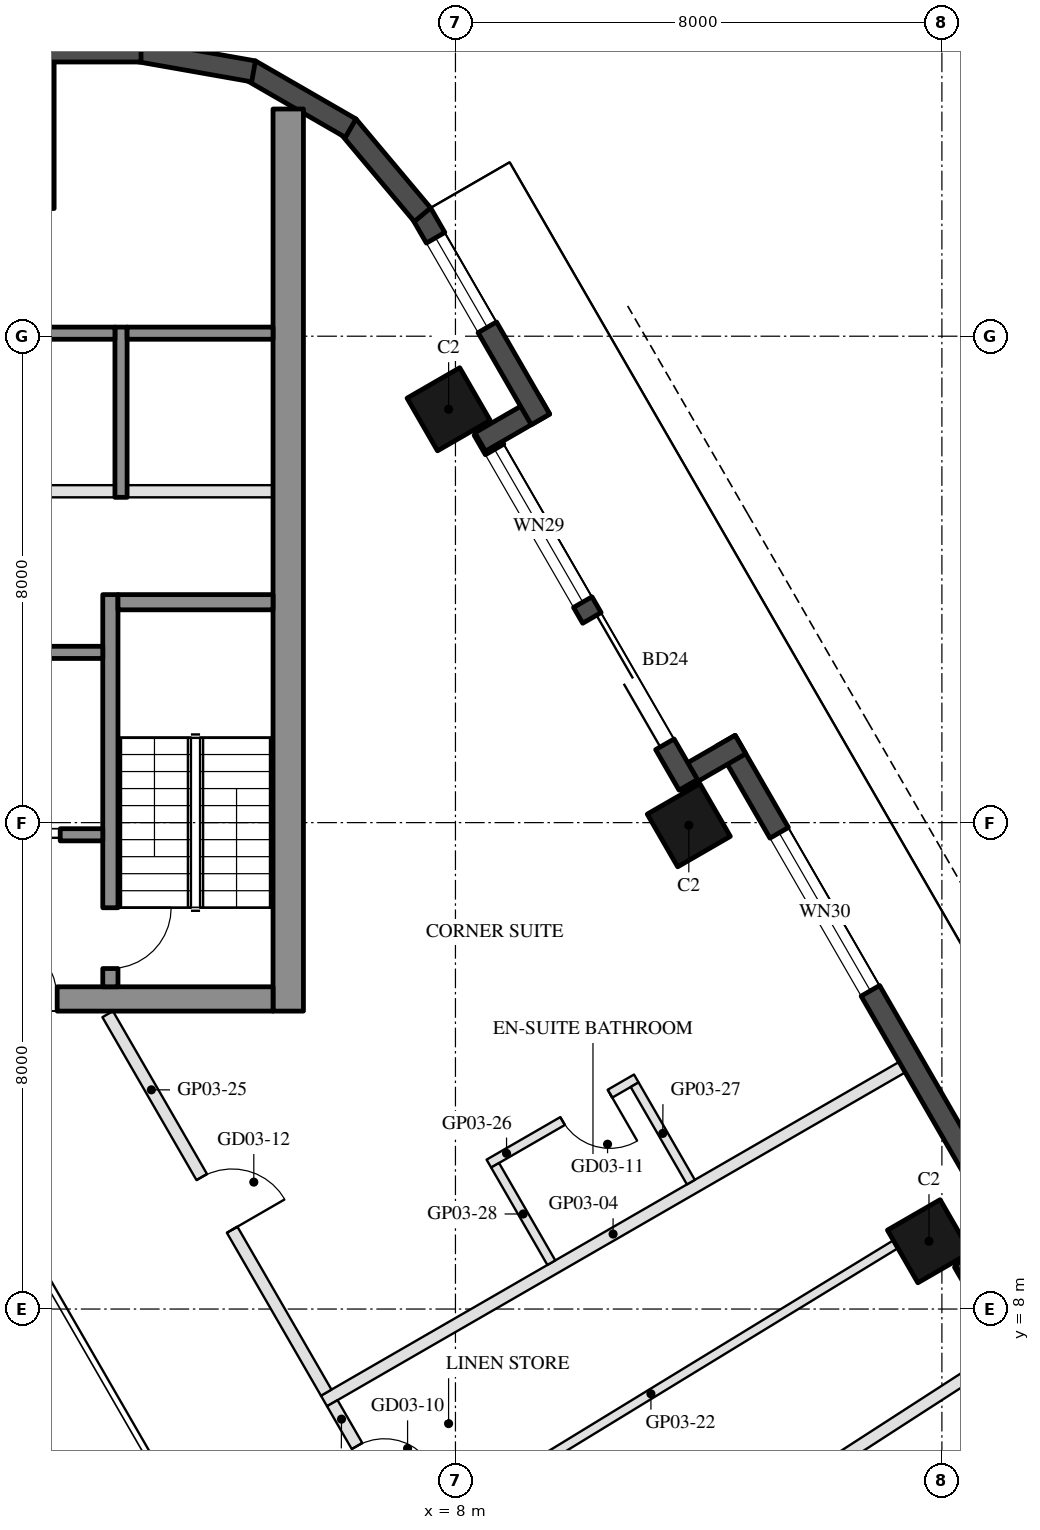
"""IFC4 building model, lengths in metres.
Left out: names, types, materials, properties, quantities, classifications, styles, units other than length and angle.
Written with IfcOpenShell. Run it as: python <this file> out.ifc"""

import sys

from ifc_helpers import new_model, si_unit, direction, frame, frame_2d, origin, origin_2d, place, context, subcontext, project, spatial, rectangle, hollow_rectangle, extrude, element, fill, save


model = new_model("IFC4")
c1 = context("Model", 3, precision=1e-05, world=origin(), true_north=direction((0.0, 1.0)))
c2 = subcontext(c1, "Body", "Model", "MODEL_VIEW")
j1 = project(units=[si_unit("LENGTHUNIT", "METRE"), si_unit("PLANEANGLEUNIT", "RADIAN")], contexts=[c1])
p1 = place(None, origin())
s1 = spatial("IfcSite", under=j1, at=p1, CompositionType="ELEMENT")
p2 = place(p1, origin())
s2 = spatial("IfcBuilding", under=s1, at=p2, CompositionType="ELEMENT")
p3 = place(p2, frame((0.0, 0.0, 68.7)))
s3 = spatial("IfcBuildingStorey", under=s2, at=p3, CompositionType="ELEMENT", Elevation=68.7)
for number, where, z_axis, x_axis in (
    (1, (15.788, 9.115, 0.0), (0.0, 0.0, 1.0), (-0.5, 0.866, 0.0)),
    (2, (11.838, 15.957, 0.0), (0.0, 0.0, 1.0), (-0.5, 0.866, 0.0)),
    (3, (7.888, 22.798, 0.0), (0.0, 0.0, 1.0), (-0.5, 0.866, 0.0)),
):
    element("IfcColumn", number, at=place(p3, frame(where, z_axis=z_axis, x_axis=x_axis)), inside=s3, PredefinedType="COLUMN", context=c2, shape_type="SweptSolid", body=[
        extrude(hollow_rectangle(XDim=1.0, YDim=1.0, WallThickness=0.045, at=origin_2d()), origin(), (0.0, 0.0, 1.0), 3.7),
    ])
p4 = place(p3, frame((0.0, 27.3, 0.0), z_axis=(0.0, 0.0, 1.0), x_axis=(1.0, 0.0, 0.0)))
e4 = element("IfcColumn", 4, at=p4, inside=s3, PredefinedType="COLUMN", context=c2, shape_type="SweptSolid", body=[
    extrude(hollow_rectangle(XDim=2.8, YDim=2.4, WallThickness=0.07, at=origin_2d()), origin(), (0.0, 0.0, 1.0), 3.7),
])
p5 = place(p3, frame((19.729, 2.938, 0.0), z_axis=(0.0, 0.0, 1.0), x_axis=(-0.499976430342, 0.866039011305, 0.0)))
e5 = element("IfcWall", 5, at=p5, inside=s3, PredefinedType="SOLIDWALL", context=c2, shape_type="SweptSolid", body=[
    extrude(rectangle(XDim=6.74, YDim=0.35, at=frame_2d((3.37, 0.0))), origin(), (0.0, 0.0, 1.0), 3.55),
])
p6 = place(p5, frame((0.77, 0.0, 0.3)))
e6 = element("IfcOpeningElement", 6, at=p6, cuts=e5, PredefinedType="OPENING", context=c2, shape_type="SweptSolid", body=[
    extrude(rectangle(XDim=1.7, YDim=2.65, at=frame_2d((0.85, 1.325))), frame((0.0, 0.185, 0.0), z_axis=(0.0, -1.0, 0.0), x_axis=(1.0, 0.0, 0.0)), (0.0, 0.0, 1.0), 0.37),
])
p7 = place(p5, frame((2.77, 0.0, 0.3)))
e7 = element("IfcOpeningElement", 7, at=p7, cuts=e5, PredefinedType="OPENING", context=c2, shape_type="SweptSolid", body=[
    extrude(rectangle(XDim=1.7, YDim=2.65, at=frame_2d((0.85, 1.325))), frame((0.0, 0.185, 0.0), z_axis=(0.0, -1.0, 0.0), x_axis=(1.0, 0.0, 0.0)), (0.0, 0.0, 1.0), 0.37),
])
p8 = place(p3, frame((16.306, 8.577, 0.0), z_axis=(0.0, 0.0, 1.0), x_axis=(0.866092288191, 0.499884134912, 0.0)))
e8 = element("IfcWall", 8, at=p8, inside=s3, PredefinedType="SOLIDWALL", context=c2, shape_type="SweptSolid", body=[
    extrude(rectangle(XDim=1.22, YDim=0.35, at=frame_2d((0.61, 0.0))), origin(), (0.0, 0.0, 1.0), 3.55),
])
p9 = place(p3, frame((17.299, 8.948, 0.0), z_axis=(0.0, 0.0, 1.0), x_axis=(-0.500010041276, 0.866019606374, 0.0)))
e9 = element("IfcWall", 9, at=p9, inside=s3, PredefinedType="SOLIDWALL", context=c2, shape_type="SweptSolid", body=[
    extrude(rectangle(XDim=9.7, YDim=0.35, at=frame_2d((4.85, 0.0))), origin(), (0.0, 0.0, 1.0), 3.55),
])
p10 = place(p9, frame((4.949, 0.0, 0.3)))
e10 = element("IfcOpeningElement", 10, at=p10, cuts=e9, PredefinedType="OPENING", context=c2, shape_type="SweptSolid", body=[
    extrude(rectangle(XDim=3.0, YDim=2.65, at=frame_2d((1.5, 1.325))), frame((0.0, 0.185, 0.0), z_axis=(0.0, -1.0, 0.0), x_axis=(1.0, 0.0, 0.0)), (0.0, 0.0, 1.0), 0.37),
])
p11 = place(p3, frame((12.688, 17.284, 0.0), z_axis=(0.0, 0.0, 1.0), x_axis=(-0.865955602162, -0.500120880472, 0.0)))
e11 = element("IfcWall", 11, at=p11, inside=s3, PredefinedType="SOLIDWALL", context=c2, shape_type="SweptSolid", body=[
    extrude(rectangle(XDim=1.22, YDim=0.35, at=frame_2d((0.61, 0.0))), origin(), (0.0, 0.0, 1.0), 3.55),
])
p12 = place(p3, frame((11.829, 16.621, 0.0), z_axis=(0.0, 0.0, 1.0), x_axis=(-0.500003597184, 0.866023326939, 0.0)))
e12 = element("IfcWall", 12, at=p12, inside=s3, PredefinedType="SOLIDWALL", context=c2, shape_type="SweptSolid", body=[
    extrude(rectangle(XDim=6.74, YDim=0.35, at=frame_2d((3.37, 0.0))), origin(), (0.0, 0.0, 1.0), 3.55),
])
p13 = place(p12, frame((0.77, 0.0, 0.0)))
e13 = element("IfcOpeningElement", 13, at=p13, cuts=e12, PredefinedType="OPENING", context=c2, shape_type="SweptSolid", body=[
    extrude(rectangle(XDim=2.4, YDim=2.4, at=frame_2d((1.2, 1.2))), frame((0.0, 0.185, 0.0), z_axis=(0.0, -1.0, 0.0), x_axis=(1.0, 0.0, 0.0)), (0.0, 0.0, 1.0), 0.37),
])
p14 = place(p12, frame((3.47, 0.0, 0.3)))
e14 = element("IfcOpeningElement", 14, at=p14, cuts=e12, PredefinedType="OPENING", context=c2, shape_type="SweptSolid", body=[
    extrude(rectangle(XDim=2.9, YDim=2.65, at=frame_2d((1.45, 1.325))), frame((0.0, 0.185, 0.0), z_axis=(0.0, -1.0, 0.0), x_axis=(1.0, 0.0, 0.0)), (0.0, 0.0, 1.0), 0.37),
])
p15 = place(p3, frame((8.406, 22.26, 0.0), z_axis=(0.0, 0.0, 1.0), x_axis=(0.865955602162, 0.500120880472, 0.0)))
e15 = element("IfcWall", 15, at=p15, inside=s3, PredefinedType="SOLIDWALL", context=c2, shape_type="SweptSolid", body=[
    extrude(rectangle(XDim=1.22, YDim=0.35, at=frame_2d((0.61, 0.0))), origin(), (0.0, 0.0, 1.0), 3.55),
])
p16 = place(p3, frame((9.398, 22.631, 0.0), z_axis=(0.0, 0.0, 1.0), x_axis=(-0.499954521343, 0.866051659307, 0.0)))
e16 = element("IfcWall", 16, at=p16, inside=s3, PredefinedType="SOLIDWALL", context=c2, shape_type="SweptSolid", body=[
    extrude(rectangle(XDim=3.916, YDim=0.35, at=frame_2d((1.958, 0.0))), origin(), (0.0, 0.0, 1.0), 3.55),
])
p17 = place(p16, frame((1.75, 0.0, 0.3)))
e17 = element("IfcOpeningElement", 17, at=p17, cuts=e16, PredefinedType="OPENING", context=c2, shape_type="SweptSolid", body=[
    extrude(rectangle(XDim=1.7, YDim=2.65, at=frame_2d((0.85, 1.325))), frame((0.0, 0.185, 0.0), z_axis=(0.0, -1.0, 0.0), x_axis=(1.0, 0.0, 0.0)), (0.0, 0.0, 1.0), 0.37),
])
p18 = place(p3, frame((7.458, 25.998, 0.0), z_axis=(0.0, 0.0, 1.0), x_axis=(-0.642808304945, 0.766027077259, 0.0)))
e18 = element("IfcWall", 18, at=p18, inside=s3, PredefinedType="SOLIDWALL", context=c2, shape_type="SweptSolid", body=[
    extrude(rectangle(XDim=1.91, YDim=0.35, at=frame_2d((0.955, 0.0))), origin(), (0.0, 0.0, 1.0), 3.55),
])
for number, where, z_axis, x_axis in (
    (19, (6.277, 27.422, 0.0), (0.0, 0.0, 1.0), (-0.866, 0.5, 0.0)),
    (20, (4.68, 28.356, 0.0), (0.0, 0.0, 1.0), (-0.985, 0.174, 0.0)),
):
    element("IfcWall", number, at=place(p3, frame(where, z_axis=z_axis, x_axis=x_axis)), inside=s3, PredefinedType="SOLIDWALL", context=c2, shape_type="SweptSolid", body=[
        extrude(rectangle(XDim=1.91, YDim=0.35, at=frame_2d((0.955, 0.0))), origin(), (0.0, 0.0, 1.0), 3.55),
    ])
p19 = place(p3, frame((2.829, 28.685, 0.0), z_axis=(0.0, 0.0, 1.0), x_axis=(-1.0, 0.0, 0.0)))
e21 = element("IfcWall", 21, at=p19, inside=s3, PredefinedType="SOLIDWALL", context=c2, shape_type="SweptSolid", body=[
    extrude(rectangle(XDim=5.658, YDim=0.35, at=frame_2d((2.829, 0.0))), origin(), (0.0, 0.0, 1.0), 3.55),
])
p20 = place(p3, frame((5.25, 12.9, 0.0), z_axis=(0.0, 0.0, 1.0), x_axis=(0.0, 1.0, 0.0)))
e22 = element("IfcWall", 22, at=p20, inside=s3, PredefinedType="SHEAR", context=c2, shape_type="SweptSolid", body=[
    extrude(rectangle(XDim=14.837, YDim=0.5, at=frame_2d((7.418, 0.0))), origin(), (0.0, 0.0, 1.0), 3.5),
])
p21 = place(p3, frame((5.0, 13.1, 0.0), z_axis=(0.0, 0.0, 1.0), x_axis=(-1.0, 0.0, 0.0)))
e23 = element("IfcWall", 23, at=p21, inside=s3, PredefinedType="SHEAR", context=c2, shape_type="SweptSolid", body=[
    extrude(rectangle(XDim=10.0, YDim=0.4, at=frame_2d((5.0, 0.0))), origin(), (0.0, 0.0, 1.0), 3.5),
])
p22 = place(p21, frame((3.55, 0.0, 0.0)))
e24 = element("IfcOpeningElement", 24, at=p22, cuts=e23, PredefinedType="OPENING", context=c2, shape_type="SweptSolid", body=[
    extrude(rectangle(XDim=1.1, YDim=2.1, at=frame_2d((0.55, 1.05))), frame((0.0, 0.21, 0.0), z_axis=(0.0, -1.0, 0.0), x_axis=(1.0, 0.0, 0.0)), (0.0, 0.0, 1.0), 0.42),
])
p23 = place(p21, frame((5.85, 0.0, 0.0)))
e25 = element("IfcOpeningElement", 25, at=p23, cuts=e23, PredefinedType="OPENING", context=c2, shape_type="SweptSolid", body=[
    extrude(rectangle(XDim=1.4, YDim=2.1, at=frame_2d((0.7, 1.05))), frame((0.0, 0.21, 0.0), z_axis=(0.0, -1.0, 0.0), x_axis=(1.0, 0.0, 0.0)), (0.0, 0.0, 1.0), 0.42),
])
p24 = place(p3, frame((2.325, 13.3, 0.0), z_axis=(0.0, 0.0, 1.0), x_axis=(0.0, 1.0, 0.0)))
e26 = element("IfcWall", 26, at=p24, inside=s3, PredefinedType="SHEAR", context=c2, shape_type="SweptSolid", body=[
    extrude(rectangle(XDim=6.45, YDim=0.25, at=frame_2d((3.225, 0.0))), origin(), (0.0, 0.0, 1.0), 3.5),
])
p25 = place(p24, frame((0.3, 0.0, 0.0)))
e27 = element("IfcOpeningElement", 27, at=p25, cuts=e26, PredefinedType="OPENING", context=c2, shape_type="SweptSolid", body=[
    extrude(rectangle(XDim=1.0, YDim=2.1, at=frame_2d((0.5, 1.05))), frame((0.0, 0.135, 0.0), z_axis=(0.0, -1.0, 0.0), x_axis=(1.0, 0.0, 0.0)), (0.0, 0.0, 1.0), 0.27),
])
p26 = place(p3, frame((5.0, 19.625, 0.0), z_axis=(0.0, 0.0, 1.0), x_axis=(-1.0, 0.0, 0.0)))
e28 = element("IfcWall", 28, at=p26, inside=s3, PredefinedType="SHEAR", context=c2, shape_type="SweptSolid", body=[
    extrude(rectangle(XDim=2.55, YDim=0.25, at=frame_2d((1.275, 0.0))), origin(), (0.0, 0.0, 1.0), 3.5),
])
p27 = place(p3, frame((2.2, 18.8, 0.0), z_axis=(0.0, 0.0, 1.0), x_axis=(-1.0, 0.0, 0.0)))
e29 = element("IfcWall", 29, at=p27, inside=s3, PredefinedType="SHEAR", context=c2, shape_type="SweptSolid", body=[
    extrude(rectangle(XDim=2.8, YDim=0.2, at=frame_2d((1.4, 0.0))), origin(), (0.0, 0.0, 1.0), 3.5),
])
p28 = place(p3, frame((2.2, 15.8, 0.0), z_axis=(0.0, 0.0, 1.0), x_axis=(-1.0, 0.0, 0.0)))
e30 = element("IfcWall", 30, at=p28, inside=s3, PredefinedType="SHEAR", context=c2, shape_type="SweptSolid", body=[
    extrude(rectangle(XDim=2.8, YDim=0.2, at=frame_2d((1.4, 0.0))), origin(), (0.0, 0.0, 1.0), 3.5),
])
p29 = place(p28, frame((0.7, 0.0, 0.0)))
e31 = element("IfcOpeningElement", 31, at=p29, cuts=e30, PredefinedType="OPENING", context=c2, shape_type="SweptSolid", body=[
    extrude(rectangle(XDim=1.2, YDim=2.1, at=frame_2d((0.6, 1.05))), frame((0.0, 0.11, 0.0), z_axis=(0.0, -1.0, 0.0), x_axis=(1.0, 0.0, 0.0)), (0.0, 0.0, 1.0), 0.22),
])
p30 = place(p3, frame((2.5, 21.35, 0.0), z_axis=(0.0, 0.0, 1.0), x_axis=(0.0, 1.0, 0.0)))
e32 = element("IfcWall", 32, at=p30, inside=s3, PredefinedType="SHEAR", context=c2, shape_type="SweptSolid", body=[
    extrude(rectangle(XDim=2.8, YDim=0.2, at=frame_2d((1.4, 0.0))), origin(), (0.0, 0.0, 1.0), 3.5),
])
p31 = place(p3, frame((5.0, 24.05, 0.0), z_axis=(0.0, 0.0, 1.0), x_axis=(-1.0, 0.0, 0.0)))
e33 = element("IfcWall", 33, at=p31, inside=s3, PredefinedType="SHEAR", context=c2, shape_type="SweptSolid", body=[
    extrude(rectangle(XDim=2.4, YDim=0.2, at=frame_2d((1.2, 0.0))), origin(), (0.0, 0.0, 1.0), 3.5),
])
p32 = place(p3, frame((2.4, 24.05, 0.0), z_axis=(0.0, 0.0, 1.0), x_axis=(-1.0, 0.0, 0.0)))
e34 = element("IfcWall", 34, at=p32, inside=s3, PredefinedType="SHEAR", context=c2, shape_type="SweptSolid", body=[
    extrude(rectangle(XDim=2.8, YDim=0.2, at=frame_2d((1.4, 0.0))), origin(), (0.0, 0.0, 1.0), 3.5),
])
p33 = place(p3, frame((5.0, 21.45, 0.0), z_axis=(0.0, 0.0, 1.0), x_axis=(-1.0, 0.0, 0.0)))
e35 = element("IfcWall", 35, at=p33, inside=s3, PredefinedType="PARTITIONING", context=c2, shape_type="SweptSolid", body=[
    extrude(rectangle(XDim=2.4, YDim=0.2, at=frame_2d((1.2, 0.0))), origin(), (0.0, 0.0, 1.0), 3.5),
])
p34 = place(p3, frame((2.4, 21.45, 0.0), z_axis=(0.0, 0.0, 1.0), x_axis=(-1.0, 0.0, 0.0)))
e36 = element("IfcWall", 36, at=p34, inside=s3, PredefinedType="PARTITIONING", context=c2, shape_type="SweptSolid", body=[
    extrude(rectangle(XDim=2.8, YDim=0.2, at=frame_2d((1.4, 0.0))), origin(), (0.0, 0.0, 1.0), 3.5),
])
p35 = place(p3, frame((17.02, 7.28, 0.0), z_axis=(0.0, 0.0, 1.0), x_axis=(-0.839924980805, -0.542702521294, 0.0)))
e37 = element("IfcWall", 37, at=p35, inside=s3, PredefinedType="PARTITIONING", context=c2, shape_type="SweptSolid", body=[
    extrude(rectangle(XDim=10.093, YDim=0.2, at=frame_2d((5.046, 0.0))), origin(), (0.0, 0.0, 1.0), 2.96),
])
p36 = place(p3, frame((15.347, 11.978, 0.0), z_axis=(0.0, 0.0, 1.0), x_axis=(-0.866027479907, -0.499996404033, 0.0)))
e38 = element("IfcWall", 38, at=p36, inside=s3, PredefinedType="PARTITIONING", context=c2, shape_type="SweptSolid", body=[
    extrude(rectangle(XDim=10.98, YDim=0.2, at=frame_2d((5.49, 0.0))), origin(), (0.0, 0.0, 1.0), 2.96),
])
p37 = place(p3, frame((15.239, 9.065, 0.0), z_axis=(0.0, 0.0, 1.0), x_axis=(-0.853241525467, -0.521515962573, 0.0)))
e39 = element("IfcWall", 39, at=p37, inside=s3, PredefinedType="PARTITIONING", context=c2, shape_type="SweptSolid", body=[
    extrude(rectangle(XDim=9.433, YDim=0.15, at=frame_2d((4.716, 0.0))), origin(), (0.0, 0.0, 1.0), 2.95),
])
p38 = place(p3, frame((5.975, 6.452, 0.0), z_axis=(0.0, 0.0, 1.0), x_axis=(0.499962146402, -0.866047257466, 0.0)))
e40 = element("IfcWall", 40, at=p38, inside=s3, PredefinedType="PARTITIONING", context=c2, shape_type="SweptSolid", body=[
    extrude(rectangle(XDim=2.528, YDim=0.2, at=frame_2d((1.264, 0.0))), origin(), (0.0, 0.0, 1.0), 2.95),
])
p39 = place(p38, frame((0.814, 0.0, 0.0)))
e41 = element("IfcOpeningElement", 41, at=p39, cuts=e40, PredefinedType="OPENING", context=c2, shape_type="SweptSolid", body=[
    extrude(rectangle(XDim=0.9, YDim=2.1, at=frame_2d((0.45, 1.05))), frame((0.0, 0.11, 0.0), z_axis=(0.0, -1.0, 0.0), x_axis=(1.0, 0.0, 0.0)), (0.0, 0.0, 1.0), 0.22),
])
p40 = place(p3, frame((2.281, 12.85, 0.0), z_axis=(0.0, 0.0, 1.0), x_axis=(0.499992939664, -0.866029480033, 0.0)))
e42 = element("IfcWall", 42, at=p40, inside=s3, PredefinedType="PARTITIONING", context=c2, shape_type="SweptSolid", body=[
    extrude(rectangle(XDim=7.188, YDim=0.2, at=frame_2d((3.594, 0.0))), origin(), (0.0, 0.0, 1.0), 2.95),
])
p41 = place(p40, frame((3.094, 0.0, 0.0)))
e43 = element("IfcOpeningElement", 43, at=p41, cuts=e42, PredefinedType="OPENING", context=c2, shape_type="SweptSolid", body=[
    extrude(rectangle(XDim=1.0, YDim=2.1, at=frame_2d((0.5, 1.05))), frame((0.0, 0.11, 0.0), z_axis=(0.0, -1.0, 0.0), x_axis=(1.0, 0.0, 0.0)), (0.0, 0.0, 1.0), 0.22),
])
p42 = place(p3, frame((10.974, 11.792, 0.0), z_axis=(0.0, 0.0, 1.0), x_axis=(-0.866056369097, -0.49994636267, 0.0)))
e44 = element("IfcWall", 44, at=p42, inside=s3, PredefinedType="PARTITIONING", context=c2, shape_type="SweptSolid", body=[
    extrude(rectangle(XDim=2.8, YDim=0.15, at=frame_2d((1.4, 0.0))), origin(), (0.0, 0.0, 1.0), 3.55),
])
p43 = place(p42, frame((0.5, 0.0, 0.0)))
e45 = element("IfcOpeningElement", 45, at=p43, cuts=e44, PredefinedType="OPENING", context=c2, shape_type="SweptSolid", body=[
    extrude(rectangle(XDim=0.9, YDim=2.1, at=frame_2d((0.45, 1.05))), frame((0.0, 0.085, 0.0), z_axis=(0.0, -1.0, 0.0), x_axis=(1.0, 0.0, 0.0)), (0.0, 0.0, 1.0), 0.17),
])
for number, where, z_axis, x_axis in (
    (46, (11.872, 10.087, 0.0), (0.0, 0.0, 1.0), (-0.5, 0.866, 0.0)),
    (47, (9.577, 8.762, 0.0), (0.0, 0.0, 1.0), (-0.5, 0.866, 0.0)),
):
    element("IfcWall", number, at=place(p3, frame(where, z_axis=z_axis, x_axis=x_axis)), inside=s3, PredefinedType="PARTITIONING", context=c2, shape_type="SweptSolid", body=[
        extrude(rectangle(XDim=1.85, YDim=0.15, at=frame_2d((0.925, 0.0))), origin(), (0.0, 0.0, 1.0), 2.95),
    ])
p44 = place(p10, origin())
e48 = element("IfcWindow", 48, at=p44, inside=s3, PartitioningType="SINGLE_PANEL", PredefinedType="WINDOW", context=c2, shape_type="SweptSolid", body=[
    extrude(rectangle(XDim=3.0, YDim=2.65, at=frame_2d((1.5, 1.325))), frame((0.0, 0.03, 0.0), z_axis=(0.0, -1.0, 0.0), x_axis=(1.0, 0.0, 0.0)), (0.0, 0.0, 1.0), 0.06),
])
fill(e10, e48)
p45 = place(p13, frame((2.4, 0.0, 0.0), z_axis=(0.0, 0.0, 1.0), x_axis=(-1.0, 0.0, 0.0)))
e49 = element("IfcDoor", 49, at=p45, inside=s3, OperationType="SLIDING_TO_LEFT", PredefinedType="DOOR", context=c2, shape_type="SweptSolid", body=[
    extrude(rectangle(XDim=2.4, YDim=2.4, at=frame_2d((1.2, 1.2))), frame((0.0, 0.025, 0.0), z_axis=(0.0, -1.0, 0.0), x_axis=(1.0, 0.0, 0.0)), (0.0, 0.0, 1.0), 0.05),
])
fill(e13, e49)
p46 = place(p14, origin())
e50 = element("IfcWindow", 50, at=p46, inside=s3, PartitioningType="SINGLE_PANEL", PredefinedType="WINDOW", context=c2, shape_type="SweptSolid", body=[
    extrude(rectangle(XDim=2.9, YDim=2.65, at=frame_2d((1.45, 1.325))), frame((0.0, 0.03, 0.0), z_axis=(0.0, -1.0, 0.0), x_axis=(1.0, 0.0, 0.0)), (0.0, 0.0, 1.0), 0.06),
])
fill(e14, e50)
p47 = place(p17, origin())
e51 = element("IfcWindow", 51, at=p47, inside=s3, PartitioningType="SINGLE_PANEL", PredefinedType="WINDOW", context=c2, shape_type="SweptSolid", body=[
    extrude(rectangle(XDim=1.7, YDim=2.65, at=frame_2d((0.85, 1.325))), frame((0.0, 0.03, 0.0), z_axis=(0.0, -1.0, 0.0), x_axis=(1.0, 0.0, 0.0)), (0.0, 0.0, 1.0), 0.06),
])
fill(e17, e51)
p48 = place(p29, origin())
e52 = element("IfcDoor", 52, at=p48, inside=s3, OperationType="DOUBLE_DOOR_SLIDING", PredefinedType="DOOR", context=c2, shape_type="SweptSolid", body=[
    extrude(rectangle(XDim=1.2, YDim=2.1, at=frame_2d((0.6, 1.05))), frame((0.0, 0.025, 0.0), z_axis=(0.0, -1.0, 0.0), x_axis=(1.0, 0.0, 0.0)), (0.0, 0.0, 1.0), 0.05),
])
fill(e31, e52)
p49 = place(p22, frame((1.1, 0.0, 0.0), z_axis=(0.0, 0.0, 1.0), x_axis=(-1.0, 0.0, 0.0)))
e53 = element("IfcDoor", 53, at=p49, inside=s3, OperationType="SINGLE_SWING_LEFT", PredefinedType="DOOR", context=c2, shape_type="SweptSolid", body=[
    extrude(rectangle(XDim=1.1, YDim=2.1, at=frame_2d((0.55, 1.05))), frame((0.0, 0.025, 0.0), z_axis=(0.0, -1.0, 0.0), x_axis=(1.0, 0.0, 0.0)), (0.0, 0.0, 1.0), 0.05),
])
fill(e24, e53)
p50 = place(p25, frame((1.0, 0.0, 0.0), z_axis=(0.0, 0.0, 1.0), x_axis=(-1.0, 0.0, 0.0)))
e54 = element("IfcDoor", 54, at=p50, inside=s3, OperationType="SINGLE_SWING_LEFT", PredefinedType="DOOR", context=c2, shape_type="SweptSolid", body=[
    extrude(rectangle(XDim=1.0, YDim=2.1, at=frame_2d((0.5, 1.05))), frame((0.0, 0.025, 0.0), z_axis=(0.0, -1.0, 0.0), x_axis=(1.0, 0.0, 0.0)), (0.0, 0.0, 1.0), 0.05),
])
fill(e27, e54)
p51 = place(p39, origin())
e55 = element("IfcDoor", 55, at=p51, inside=s3, OperationType="SINGLE_SWING_RIGHT", PredefinedType="DOOR", context=c2, shape_type="SweptSolid", body=[
    extrude(rectangle(XDim=0.9, YDim=2.1, at=frame_2d((0.45, 1.05))), frame((0.0, 0.025, 0.0), z_axis=(0.0, -1.0, 0.0), x_axis=(1.0, 0.0, 0.0)), (0.0, 0.0, 1.0), 0.05),
])
fill(e41, e55)
p52 = place(p43, origin())
e56 = element("IfcDoor", 56, at=p52, inside=s3, OperationType="SINGLE_SWING_LEFT", PredefinedType="DOOR", context=c2, shape_type="SweptSolid", body=[
    extrude(rectangle(XDim=0.9, YDim=2.1, at=frame_2d((0.45, 1.05))), frame((0.0, 0.025, 0.0), z_axis=(0.0, -1.0, 0.0), x_axis=(1.0, 0.0, 0.0)), (0.0, 0.0, 1.0), 0.05),
])
fill(e45, e56)
p53 = place(p41, origin())
e57 = element("IfcDoor", 57, at=p53, inside=s3, OperationType="SINGLE_SWING_RIGHT", PredefinedType="DOOR", context=c2, shape_type="SweptSolid", body=[
    extrude(rectangle(XDim=1.0, YDim=2.1, at=frame_2d((0.5, 1.05))), frame((0.0, 0.025, 0.0), z_axis=(0.0, -1.0, 0.0), x_axis=(1.0, 0.0, 0.0)), (0.0, 0.0, 1.0), 0.05),
])
fill(e43, e57)
save(model, sys.argv[1])
